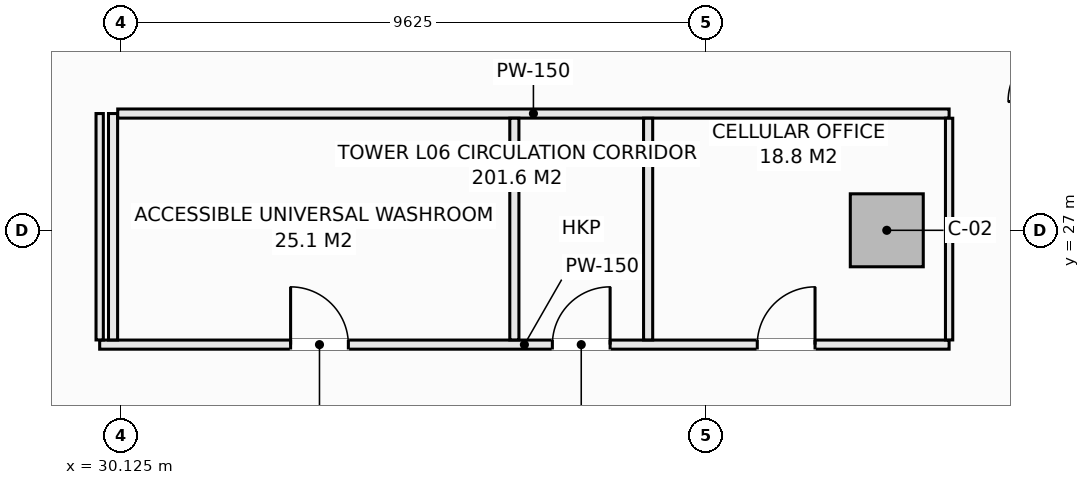
"""IFC4 building model, lengths in metres.
Left out: names, types, materials, properties, quantities, classifications, styles, units other than length and angle.
Written with IfcOpenShell. Run it as: python <this file> out.ifc"""

import sys

from ifc_helpers import new_model, si_unit, direction, frame, frame_2d, origin, origin_2d, place, context, subcontext, project, spatial, rectangle, extrude, element, fill, save


model = new_model("IFC4")
c1 = context("Model", 3, precision=1e-05, world=origin(), true_north=direction((0.0, 1.0)))
c2 = subcontext(c1, "Body", "Model", "MODEL_VIEW")
j1 = project(units=[si_unit("LENGTHUNIT", "METRE"), si_unit("PLANEANGLEUNIT", "RADIAN")], contexts=[c1])
p1 = place(None, origin())
s1 = spatial("IfcSite", under=j1, at=p1, CompositionType="ELEMENT")
p2 = place(p1, origin())
s2 = spatial("IfcBuilding", under=s1, at=p2, CompositionType="ELEMENT")
p3 = place(p2, frame((0.0, 0.0, 30.35)))
s3 = spatial("IfcBuildingStorey", under=s2, at=p3, CompositionType="ELEMENT", Elevation=30.35)
p4 = place(p3, frame((42.725, 27.0, -0.28), z_axis=(0.0, 0.0, 1.0), x_axis=(1.0, 0.0, 0.0)))
e1 = element("IfcColumn", 1, at=p4, inside=s3, PredefinedType="COLUMN", context=c2, shape_type="SweptSolid", body=[
    extrude(rectangle(XDim=1.2, YDim=1.2, at=origin_2d()), origin(), (0.0, 0.0, 1.0), 3.85),
])
p5 = place(p3, frame((29.78, 25.12, 0.0), z_axis=(0.0, 0.0, 1.0), x_axis=(1.0, 0.0, 0.0)))
e2 = element("IfcWall", 2, at=p5, inside=s3, PredefinedType="PARTITIONING", context=c2, shape_type="SweptSolid", body=[
    extrude(rectangle(XDim=13.97, YDim=0.15, at=frame_2d((6.985, 0.0))), origin(), (0.0, 0.0, 1.0), 3.57),
])
p6 = place(p5, frame((3.14, 0.0, 0.0)))
e3 = element("IfcOpeningElement", 3, at=p6, cuts=e2, PredefinedType="OPENING", context=c2, shape_type="SweptSolid", body=[
    extrude(rectangle(XDim=0.95, YDim=2.1, at=frame_2d((0.475, 1.05))), frame((0.0, 0.085, 0.0), z_axis=(0.0, -1.0, 0.0), x_axis=(1.0, 0.0, 0.0)), (0.0, 0.0, 1.0), 0.17),
])
p7 = place(p5, frame((7.445, 0.0, 0.0)))
e4 = element("IfcOpeningElement", 4, at=p7, cuts=e2, PredefinedType="OPENING", context=c2, shape_type="SweptSolid", body=[
    extrude(rectangle(XDim=0.95, YDim=2.1, at=frame_2d((0.475, 1.05))), frame((0.0, 0.085, 0.0), z_axis=(0.0, -1.0, 0.0), x_axis=(1.0, 0.0, 0.0)), (0.0, 0.0, 1.0), 0.17),
])
p8 = place(p5, frame((10.815, 0.0, 0.0)))
e5 = element("IfcOpeningElement", 5, at=p8, cuts=e2, PredefinedType="OPENING", context=c2, shape_type="SweptSolid", body=[
    extrude(rectangle(XDim=0.95, YDim=2.1, at=frame_2d((0.475, 1.05))), frame((0.0, 0.085, 0.0), z_axis=(0.0, -1.0, 0.0), x_axis=(1.0, 0.0, 0.0)), (0.0, 0.0, 1.0), 0.17),
])
p9 = place(p3, frame((30.0, 25.197, 0.0), z_axis=(0.0, 0.0, 1.0), x_axis=(0.0, 1.0, 0.0)))
e6 = element("IfcWall", 6, at=p9, inside=s3, PredefinedType="PARTITIONING", context=c2, shape_type="SweptSolid", body=[
    extrude(rectangle(XDim=3.723, YDim=0.15, at=frame_2d((1.861, 0.0))), origin(), (0.0, 0.0, 1.0), 3.57),
])
p10 = place(p3, frame((30.077, 28.92, 0.0), z_axis=(0.0, 0.0, 1.0), x_axis=(1.0, 0.0, 0.0)))
e7 = element("IfcWall", 7, at=p10, inside=s3, PredefinedType="PARTITIONING", context=c2, shape_type="SweptSolid", body=[
    extrude(rectangle(XDim=13.673, YDim=0.15, at=frame_2d((6.836, 0.0))), origin(), (0.0, 0.0, 1.0), 3.57),
])
for number, where, z_axis, x_axis in (
    (8, (36.6, 25.197, 0.0), (0.0, 0.0, 1.0), (0.0, 1.0, 0.0)),
    (9, (38.8, 25.197, 0.0), (0.0, 0.0, 1.0), (0.0, 1.0, 0.0)),
):
    element("IfcWall", number, at=place(p3, frame(where, z_axis=z_axis, x_axis=x_axis)), inside=s3, PredefinedType="PARTITIONING", context=c2, shape_type="SweptSolid", body=[
        extrude(rectangle(XDim=3.646, YDim=0.15, at=frame_2d((1.823, 0.0))), origin(), (0.0, 0.0, 1.0), 3.57),
    ])
p11 = place(p3, frame((29.78, 25.197, 0.0), z_axis=(0.0, 0.0, 1.0), x_axis=(0.0, 1.0, 0.0)))
e10 = element("IfcWall", 10, at=p11, inside=s3, PredefinedType="PARTITIONING", context=c2, shape_type="SweptSolid", body=[
    extrude(rectangle(XDim=3.723, YDim=0.12, at=frame_2d((1.861, 0.0))), origin(), (0.0, 0.0, 1.0), 3.57),
])
p12 = place(p3, frame((43.75, 25.197, 0.0), z_axis=(0.0, 0.0, 1.0), x_axis=(0.0, 1.0, 0.0)))
e11 = element("IfcWall", 11, at=p12, inside=s3, PredefinedType="PARTITIONING", context=c2, shape_type="SweptSolid", body=[
    extrude(rectangle(XDim=3.646, YDim=0.12, at=frame_2d((1.823, 0.0))), origin(), (0.0, 0.0, 1.0), 3.57),
])
p13 = place(p6, origin())
e12 = element("IfcDoor", 12, at=p13, inside=s3, OperationType="SINGLE_SWING_LEFT", PredefinedType="DOOR", context=c2, shape_type="SweptSolid", body=[
    extrude(rectangle(XDim=0.95, YDim=2.1, at=frame_2d((0.475, 1.05))), frame((0.0, 0.025, 0.0), z_axis=(0.0, -1.0, 0.0), x_axis=(1.0, 0.0, 0.0)), (0.0, 0.0, 1.0), 0.05),
])
fill(e3, e12)
p14 = place(p7, origin())
e13 = element("IfcDoor", 13, at=p14, inside=s3, OperationType="SINGLE_SWING_RIGHT", PredefinedType="DOOR", context=c2, shape_type="SweptSolid", body=[
    extrude(rectangle(XDim=0.95, YDim=2.1, at=frame_2d((0.475, 1.05))), frame((0.0, 0.025, 0.0), z_axis=(0.0, -1.0, 0.0), x_axis=(1.0, 0.0, 0.0)), (0.0, 0.0, 1.0), 0.05),
])
fill(e4, e13)
p15 = place(p8, origin())
e14 = element("IfcDoor", 14, at=p15, inside=s3, OperationType="SINGLE_SWING_RIGHT", PredefinedType="DOOR", context=c2, shape_type="SweptSolid", body=[
    extrude(rectangle(XDim=0.95, YDim=2.1, at=frame_2d((0.475, 1.05))), frame((0.0, 0.025, 0.0), z_axis=(0.0, -1.0, 0.0), x_axis=(1.0, 0.0, 0.0)), (0.0, 0.0, 1.0), 0.05),
])
fill(e5, e14)
save(model, sys.argv[1])
